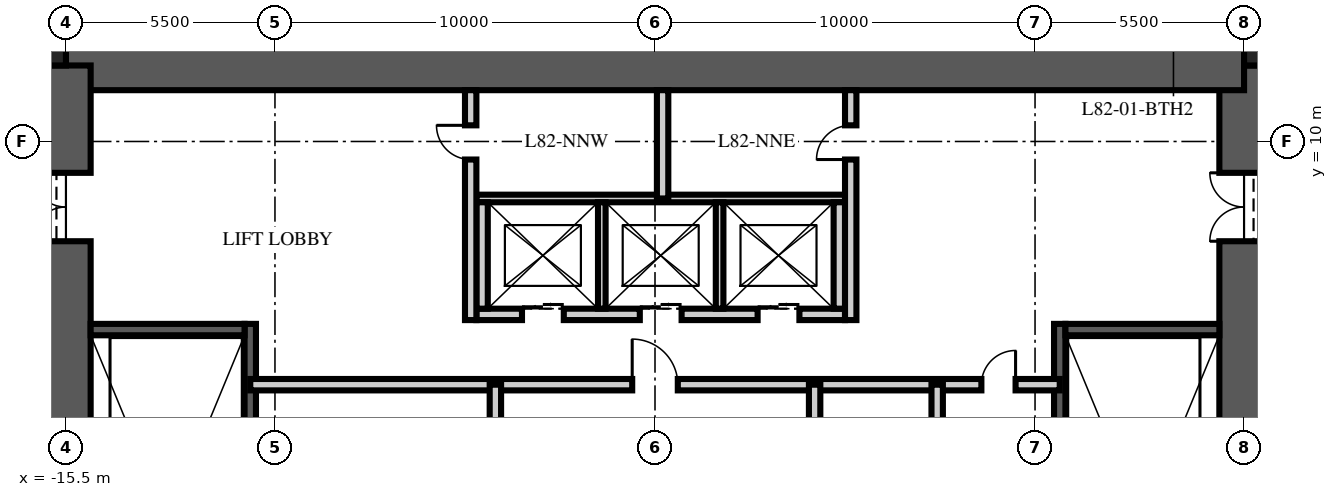
"""IFC4 building model, lengths in metres.
Left out: names, types, materials, properties, quantities, classifications, styles, units other than length and angle.
Written with IfcOpenShell. Run it as: python <this file> out.ifc"""

import sys

from ifc_helpers import new_model, si_unit, direction, frame, frame_2d, origin, origin_2d, place, context, subcontext, project, spatial, rectangle, extrude, element, fill, save


model = new_model("IFC4")
c1 = context("Model", 3, precision=1e-05, world=origin(), true_north=direction((0.0, 1.0)))
c2 = subcontext(c1, "Body", "Model", "MODEL_VIEW")
j1 = project(units=[si_unit("LENGTHUNIT", "METRE"), si_unit("PLANEANGLEUNIT", "RADIAN")], contexts=[c1])
p1 = place(None, origin())
s1 = spatial("IfcSite", under=j1, at=p1, CompositionType="ELEMENT")
p2 = place(p1, origin())
s2 = spatial("IfcBuilding", under=s1, at=p2, CompositionType="ELEMENT")
p3 = place(p2, frame((0.0, 0.0, 327.0)))
s3 = spatial("IfcBuildingStorey", under=s2, at=p3, CompositionType="ELEMENT", Elevation=327.0)
p4 = place(p3, frame((15.5, -12.0, -0.25), z_axis=(0.0, 0.0, 1.0), x_axis=(0.0, 1.0, 0.0)))
e1 = element("IfcWall", 1, at=p4, inside=s3, PredefinedType="SHEAR", context=c2, shape_type="SweptSolid", body=[
    extrude(rectangle(XDim=24.0, YDim=1.3, at=frame_2d((12.0, 0.0))), origin(), (0.0, 0.0, 1.0), 3.75),
])
p5 = place(p4, frame((3.125, 0.0, 0.25)))
e2 = element("IfcOpeningElement", 2, at=p5, cuts=e1, PredefinedType="OPENING", context=c2, shape_type="SweptSolid", body=[
    extrude(rectangle(XDim=1.2, YDim=2.1, at=frame_2d((0.6, 1.05))), frame((0.0, 0.66, 0.0), z_axis=(0.0, -1.0, 0.0), x_axis=(1.0, 0.0, 0.0)), (0.0, 0.0, 1.0), 1.32),
])
p6 = place(p4, frame((19.375, 0.0, 0.25)))
e3 = element("IfcOpeningElement", 3, at=p6, cuts=e1, PredefinedType="OPENING", context=c2, shape_type="SweptSolid", body=[
    extrude(rectangle(XDim=1.8, YDim=2.1, at=frame_2d((0.9, 1.05))), frame((0.0, 0.66, 0.0), z_axis=(0.0, -1.0, 0.0), x_axis=(1.0, 0.0, 0.0)), (0.0, 0.0, 1.0), 1.32),
])
p7 = place(p3, frame((-15.5, 12.0, -0.25), z_axis=(0.0, 0.0, 1.0), x_axis=(1.0, 0.0, 0.0)))
e4 = element("IfcWall", 4, at=p7, inside=s3, PredefinedType="SHEAR", context=c2, shape_type="SweptSolid", body=[
    extrude(rectangle(XDim=31.0, YDim=1.3, at=frame_2d((15.5, 0.0))), origin(), (0.0, 0.0, 1.0), 3.75),
])
p8 = place(p3, frame((-15.5, -12.0, -0.25), z_axis=(0.0, 0.0, 1.0), x_axis=(0.0, 1.0, 0.0)))
e5 = element("IfcWall", 5, at=p8, inside=s3, PredefinedType="SHEAR", context=c2, shape_type="SweptSolid", body=[
    extrude(rectangle(XDim=24.0, YDim=1.3, at=frame_2d((12.0, 0.0))), origin(), (0.0, 0.0, 1.0), 3.75),
])
p9 = place(p8, frame((3.125, 0.0, 0.25)))
e6 = element("IfcOpeningElement", 6, at=p9, cuts=e5, PredefinedType="OPENING", context=c2, shape_type="SweptSolid", body=[
    extrude(rectangle(XDim=1.2, YDim=2.1, at=frame_2d((0.6, 1.05))), frame((0.0, 0.66, 0.0), z_axis=(0.0, -1.0, 0.0), x_axis=(1.0, 0.0, 0.0)), (0.0, 0.0, 1.0), 1.32),
])
p10 = place(p8, frame((19.375, 0.0, 0.25)))
e7 = element("IfcOpeningElement", 7, at=p10, cuts=e5, PredefinedType="OPENING", context=c2, shape_type="SweptSolid", body=[
    extrude(rectangle(XDim=1.8, YDim=2.1, at=frame_2d((0.9, 1.05))), frame((0.0, 0.66, 0.0), z_axis=(0.0, -1.0, 0.0), x_axis=(1.0, 0.0, 0.0)), (0.0, 0.0, 1.0), 1.32),
])
for number, where, z_axis, x_axis in (
    (8, (15.825, 12.325, -0.25), (0.0, 0.0, 1.0), (1.0, 0.0, 0.0)),
    (9, (-15.825, 12.325, -0.25), (0.0, 0.0, 1.0), (1.0, 0.0, 0.0)),
):
    element("IfcColumn", number, at=place(p3, frame(where, z_axis=z_axis, x_axis=x_axis)), inside=s3, PredefinedType="COLUMN", context=c2, shape_type="SweptSolid", body=[
        extrude(rectangle(XDim=0.65, YDim=0.65, at=origin_2d()), origin(), (0.0, 0.0, 1.0), 3.75),
    ])
p11 = place(p3, frame((-10.65, -4.9, 0.0), z_axis=(0.0, 0.0, 1.0), x_axis=(0.0, 1.0, 0.0)))
e10 = element("IfcWall", 10, at=p11, inside=s3, PredefinedType="SOLIDWALL", context=c2, shape_type="SweptSolid", body=[
    extrude(rectangle(XDim=10.1, YDim=0.3, at=frame_2d((5.05, 0.0))), origin(), (0.0, 0.0, 1.0), 3.5),
])
p12 = place(p3, frame((-14.85, 5.05, 0.0), z_axis=(0.0, 0.0, 1.0), x_axis=(1.0, 0.0, 0.0)))
e11 = element("IfcWall", 11, at=p12, inside=s3, PredefinedType="SOLIDWALL", context=c2, shape_type="SweptSolid", body=[
    extrude(rectangle(XDim=4.05, YDim=0.3, at=frame_2d((2.025, 0.0))), origin(), (0.0, 0.0, 1.0), 3.5),
])
p13 = place(p3, frame((10.65, -4.9, 0.0), z_axis=(0.0, 0.0, 1.0), x_axis=(0.0, 1.0, 0.0)))
e12 = element("IfcWall", 12, at=p13, inside=s3, PredefinedType="SOLIDWALL", context=c2, shape_type="SweptSolid", body=[
    extrude(rectangle(XDim=10.1, YDim=0.3, at=frame_2d((5.05, 0.0))), origin(), (0.0, 0.0, 1.0), 3.5),
])
p14 = place(p3, frame((14.85, 5.05, 0.0), z_axis=(0.0, 0.0, 1.0), x_axis=(-1.0, 0.0, 0.0)))
e13 = element("IfcWall", 13, at=p14, inside=s3, PredefinedType="SOLIDWALL", context=c2, shape_type="SweptSolid", body=[
    extrude(rectangle(XDim=4.05, YDim=0.3, at=frame_2d((2.025, 0.0))), origin(), (0.0, 0.0, 1.0), 3.5),
])
p15 = place(p3, frame((-4.7, 5.45, 0.0), z_axis=(0.0, 0.0, 1.0), x_axis=(1.0, 0.0, 0.0)))
e14 = element("IfcWall", 14, at=p15, inside=s3, PredefinedType="PARTITIONING", context=c2, shape_type="SweptSolid", body=[
    extrude(rectangle(XDim=9.7, YDim=0.3, at=frame_2d((4.85, 0.0))), origin(), (0.0, 0.0, 1.0), 3.5),
])
p16 = place(p15, frame((1.2, 0.0, 0.0)))
e15 = element("IfcOpeningElement", 15, at=p16, cuts=e14, PredefinedType="OPENING", context=c2, shape_type="SweptSolid", body=[
    extrude(rectangle(XDim=1.1, YDim=2.1, at=frame_2d((0.55, 1.05))), frame((0.0, 0.16, 0.0), z_axis=(0.0, -1.0, 0.0), x_axis=(1.0, 0.0, 0.0)), (0.0, 0.0, 1.0), 0.32),
])
p17 = place(p15, frame((4.3, 0.0, 0.0)))
e16 = element("IfcOpeningElement", 16, at=p17, cuts=e14, PredefinedType="OPENING", context=c2, shape_type="SweptSolid", body=[
    extrude(rectangle(XDim=1.1, YDim=2.1, at=frame_2d((0.55, 1.05))), frame((0.0, 0.16, 0.0), z_axis=(0.0, -1.0, 0.0), x_axis=(1.0, 0.0, 0.0)), (0.0, 0.0, 1.0), 0.32),
])
p18 = place(p15, frame((7.4, 0.0, 0.0)))
e17 = element("IfcOpeningElement", 17, at=p18, cuts=e14, PredefinedType="OPENING", context=c2, shape_type="SweptSolid", body=[
    extrude(rectangle(XDim=1.1, YDim=2.1, at=frame_2d((0.55, 1.05))), frame((0.0, 0.16, 0.0), z_axis=(0.0, -1.0, 0.0), x_axis=(1.0, 0.0, 0.0)), (0.0, 0.0, 1.0), 0.32),
])
p19 = place(p3, frame((-4.7, 8.5, 0.0), z_axis=(0.0, 0.0, 1.0), x_axis=(1.0, 0.0, 0.0)))
e18 = element("IfcWall", 18, at=p19, inside=s3, PredefinedType="PARTITIONING", context=c2, shape_type="SweptSolid", body=[
    extrude(rectangle(XDim=9.7, YDim=0.2, at=frame_2d((4.85, 0.0))), origin(), (0.0, 0.0, 1.0), 3.5),
])
for number, where, z_axis, x_axis in (
    (19, (-4.55, 5.6, 0.0), (0.0, 0.0, 1.0), (0.0, 1.0, 0.0)),
    (20, (4.85, 5.6, 0.0), (0.0, 0.0, 1.0), (0.0, 1.0, 0.0)),
):
    element("IfcWall", number, at=place(p3, frame(where, z_axis=z_axis, x_axis=x_axis)), inside=s3, PredefinedType="PARTITIONING", context=c2, shape_type="SweptSolid", body=[
        extrude(rectangle(XDim=2.8, YDim=0.3, at=frame_2d((1.4, 0.0))), origin(), (0.0, 0.0, 1.0), 3.5),
    ])
for number, where, z_axis, x_axis in (
    (21, (-1.4, 5.6, 0.0), (0.0, 0.0, 1.0), (0.0, 1.0, 0.0)),
    (22, (1.7, 5.6, 0.0), (0.0, 0.0, 1.0), (0.0, 1.0, 0.0)),
):
    element("IfcWall", number, at=place(p3, frame(where, z_axis=z_axis, x_axis=x_axis)), inside=s3, PredefinedType="PARTITIONING", context=c2, shape_type="SweptSolid", body=[
        extrude(rectangle(XDim=2.8, YDim=0.2, at=frame_2d((1.4, 0.0))), origin(), (0.0, 0.0, 1.0), 3.5),
    ])
p20 = place(p3, frame((-10.65, 3.6, 0.0), z_axis=(0.0, 0.0, 1.0), x_axis=(1.0, 0.0, 0.0)))
e23 = element("IfcWall", 23, at=p20, inside=s3, PredefinedType="PARTITIONING", context=c2, shape_type="SweptSolid", body=[
    extrude(rectangle(XDim=21.3, YDim=0.3, at=frame_2d((10.65, 0.0))), origin(), (0.0, 0.0, 1.0), 3.5),
])
p21 = place(p20, frame((10.05, 0.0, 0.0)))
e24 = element("IfcOpeningElement", 24, at=p21, cuts=e23, PredefinedType="OPENING", context=c2, shape_type="SweptSolid", body=[
    extrude(rectangle(XDim=1.2, YDim=2.1, at=frame_2d((0.6, 1.05))), frame((0.0, 0.16, 0.0), z_axis=(0.0, -1.0, 0.0), x_axis=(1.0, 0.0, 0.0)), (0.0, 0.0, 1.0), 0.32),
])
p22 = place(p20, frame((19.238, 0.0, 0.0)))
e25 = element("IfcOpeningElement", 25, at=p22, cuts=e23, PredefinedType="OPENING", context=c2, shape_type="SweptSolid", body=[
    extrude(rectangle(XDim=0.9, YDim=2.1, at=frame_2d((0.45, 1.05))), frame((0.0, 0.16, 0.0), z_axis=(0.0, -1.0, 0.0), x_axis=(1.0, 0.0, 0.0)), (0.0, 0.0, 1.0), 0.32),
])
p23 = place(p3, frame((-4.2, -6.65, 0.0), z_axis=(0.0, 0.0, 1.0), x_axis=(0.0, 1.0, 0.0)))
e26 = element("IfcWall", 26, at=p23, inside=s3, PredefinedType="PARTITIONING", context=c2, shape_type="SweptSolid", body=[
    extrude(rectangle(XDim=10.25, YDim=0.3, at=frame_2d((5.125, 0.0))), origin(), (0.0, 0.0, 1.0), 3.5),
])
p24 = place(p23, frame((0.787, 0.0, 0.0)))
e27 = element("IfcOpeningElement", 27, at=p24, cuts=e26, PredefinedType="OPENING", context=c2, shape_type="SweptSolid", body=[
    extrude(rectangle(XDim=0.9, YDim=2.1, at=frame_2d((0.45, 1.05))), frame((0.0, 0.16, 0.0), z_axis=(0.0, -1.0, 0.0), x_axis=(1.0, 0.0, 0.0)), (0.0, 0.0, 1.0), 0.32),
])
p25 = place(p23, frame((5.912, 0.0, 0.0)))
e28 = element("IfcOpeningElement", 28, at=p25, cuts=e26, PredefinedType="OPENING", context=c2, shape_type="SweptSolid", body=[
    extrude(rectangle(XDim=0.9, YDim=2.1, at=frame_2d((0.45, 1.05))), frame((0.0, 0.16, 0.0), z_axis=(0.0, -1.0, 0.0), x_axis=(1.0, 0.0, 0.0)), (0.0, 0.0, 1.0), 0.32),
])
p26 = place(p3, frame((4.2, -6.65, 0.0), z_axis=(0.0, 0.0, 1.0), x_axis=(0.0, 1.0, 0.0)))
e29 = element("IfcWall", 29, at=p26, inside=s3, PredefinedType="PARTITIONING", context=c2, shape_type="SweptSolid", body=[
    extrude(rectangle(XDim=10.25, YDim=0.3, at=frame_2d((5.125, 0.0))), origin(), (0.0, 0.0, 1.0), 3.5),
])
p27 = place(p26, frame((2.15, 0.0, 0.0)))
e30 = element("IfcOpeningElement", 30, at=p27, cuts=e29, PredefinedType="OPENING", context=c2, shape_type="SweptSolid", body=[
    extrude(rectangle(XDim=0.9, YDim=2.1, at=frame_2d((0.45, 1.05))), frame((0.0, 0.16, 0.0), z_axis=(0.0, -1.0, 0.0), x_axis=(1.0, 0.0, 0.0)), (0.0, 0.0, 1.0), 0.32),
])
p28 = place(p26, frame((7.275, 0.0, 0.0)))
e31 = element("IfcOpeningElement", 31, at=p28, cuts=e29, PredefinedType="OPENING", context=c2, shape_type="SweptSolid", body=[
    extrude(rectangle(XDim=0.9, YDim=2.1, at=frame_2d((0.45, 1.05))), frame((0.0, 0.16, 0.0), z_axis=(0.0, -1.0, 0.0), x_axis=(1.0, 0.0, 0.0)), (0.0, 0.0, 1.0), 0.32),
])
p29 = place(p3, frame((7.425, -1.45, 0.0), z_axis=(0.0, 0.0, 1.0), x_axis=(0.0, 1.0, 0.0)))
e32 = element("IfcWall", 32, at=p29, inside=s3, PredefinedType="PARTITIONING", context=c2, shape_type="SweptSolid", body=[
    extrude(rectangle(XDim=5.05, YDim=0.3, at=frame_2d((2.525, 0.0))), origin(), (0.0, 0.0, 1.0), 3.5),
])
p30 = place(p3, frame((-4.85, 5.3, 0.0), z_axis=(0.0, 0.0, 1.0), x_axis=(0.0, 1.0, 0.0)))
e33 = element("IfcWall", 33, at=p30, inside=s3, PredefinedType="PARTITIONING", context=c2, shape_type="SweptSolid", body=[
    extrude(rectangle(XDim=6.05, YDim=0.3, at=frame_2d((3.025, 0.0))), origin(), (0.0, 0.0, 1.0), 3.5),
])
p31 = place(p30, frame((4.225, 0.0, 0.0)))
e34 = element("IfcOpeningElement", 34, at=p31, cuts=e33, PredefinedType="OPENING", context=c2, shape_type="SweptSolid", body=[
    extrude(rectangle(XDim=0.9, YDim=2.1, at=frame_2d((0.45, 1.05))), frame((0.0, 0.16, 0.0), z_axis=(0.0, -1.0, 0.0), x_axis=(1.0, 0.0, 0.0)), (0.0, 0.0, 1.0), 0.32),
])
p32 = place(p3, frame((5.15, 5.3, 0.0), z_axis=(0.0, 0.0, 1.0), x_axis=(0.0, 1.0, 0.0)))
e35 = element("IfcWall", 35, at=p32, inside=s3, PredefinedType="PARTITIONING", context=c2, shape_type="SweptSolid", body=[
    extrude(rectangle(XDim=6.05, YDim=0.3, at=frame_2d((3.025, 0.0))), origin(), (0.0, 0.0, 1.0), 3.5),
])
p33 = place(p32, frame((4.225, 0.0, 0.0)))
e36 = element("IfcOpeningElement", 36, at=p33, cuts=e35, PredefinedType="OPENING", context=c2, shape_type="SweptSolid", body=[
    extrude(rectangle(XDim=0.9, YDim=2.1, at=frame_2d((0.45, 1.05))), frame((0.0, 0.16, 0.0), z_axis=(0.0, -1.0, 0.0), x_axis=(1.0, 0.0, 0.0)), (0.0, 0.0, 1.0), 0.32),
])
p34 = place(p3, frame((0.2, 8.5, 0.0), z_axis=(0.0, 0.0, 1.0), x_axis=(0.0, 1.0, 0.0)))
e37 = element("IfcWall", 37, at=p34, inside=s3, PredefinedType="PARTITIONING", context=c2, shape_type="SweptSolid", body=[
    extrude(rectangle(XDim=2.85, YDim=0.3, at=frame_2d((1.425, 0.0))), origin(), (0.0, 0.0, 1.0), 3.5),
])
p35 = place(p10, origin())
e38 = element("IfcDoor", 38, at=p35, inside=s3, OperationType="DOUBLE_DOOR_SINGLE_SWING", PredefinedType="DOOR", context=c2, shape_type="SweptSolid", body=[
    extrude(rectangle(XDim=1.8, YDim=2.1, at=frame_2d((0.9, 1.05))), frame((0.0, 0.025, 0.0), z_axis=(0.0, -1.0, 0.0), x_axis=(1.0, 0.0, 0.0)), (0.0, 0.0, 1.0), 0.05),
])
fill(e7, e38)
p36 = place(p6, origin())
e39 = element("IfcDoor", 39, at=p36, inside=s3, OperationType="DOUBLE_DOOR_SINGLE_SWING", PredefinedType="DOOR", context=c2, shape_type="SweptSolid", body=[
    extrude(rectangle(XDim=1.8, YDim=2.1, at=frame_2d((0.9, 1.05))), frame((0.0, 0.025, 0.0), z_axis=(0.0, -1.0, 0.0), x_axis=(1.0, 0.0, 0.0)), (0.0, 0.0, 1.0), 0.05),
])
fill(e3, e39)
p37 = place(p16, origin())
e40 = element("IfcDoor", 40, at=p37, inside=s3, OperationType="DOUBLE_DOOR_SLIDING", PredefinedType="DOOR", context=c2, shape_type="SweptSolid", body=[
    extrude(rectangle(XDim=1.1, YDim=2.1, at=frame_2d((0.55, 1.05))), frame((0.0, 0.025, 0.0), z_axis=(0.0, -1.0, 0.0), x_axis=(1.0, 0.0, 0.0)), (0.0, 0.0, 1.0), 0.05),
])
fill(e15, e40)
p38 = place(p17, origin())
e41 = element("IfcDoor", 41, at=p38, inside=s3, OperationType="DOUBLE_DOOR_SLIDING", PredefinedType="DOOR", context=c2, shape_type="SweptSolid", body=[
    extrude(rectangle(XDim=1.1, YDim=2.1, at=frame_2d((0.55, 1.05))), frame((0.0, 0.025, 0.0), z_axis=(0.0, -1.0, 0.0), x_axis=(1.0, 0.0, 0.0)), (0.0, 0.0, 1.0), 0.05),
])
fill(e16, e41)
p39 = place(p18, origin())
e42 = element("IfcDoor", 42, at=p39, inside=s3, OperationType="DOUBLE_DOOR_SLIDING", PredefinedType="DOOR", context=c2, shape_type="SweptSolid", body=[
    extrude(rectangle(XDim=1.1, YDim=2.1, at=frame_2d((0.55, 1.05))), frame((0.0, 0.025, 0.0), z_axis=(0.0, -1.0, 0.0), x_axis=(1.0, 0.0, 0.0)), (0.0, 0.0, 1.0), 0.05),
])
fill(e17, e42)
p40 = place(p21, origin())
e43 = element("IfcDoor", 43, at=p40, inside=s3, OperationType="SINGLE_SWING_LEFT", PredefinedType="DOOR", context=c2, shape_type="SweptSolid", body=[
    extrude(rectangle(XDim=1.2, YDim=2.1, at=frame_2d((0.6, 1.05))), frame((0.0, 0.025, 0.0), z_axis=(0.0, -1.0, 0.0), x_axis=(1.0, 0.0, 0.0)), (0.0, 0.0, 1.0), 0.05),
])
fill(e24, e43)
p41 = place(p22, origin())
e44 = element("IfcDoor", 44, at=p41, inside=s3, OperationType="SINGLE_SWING_RIGHT", PredefinedType="DOOR", context=c2, shape_type="SweptSolid", body=[
    extrude(rectangle(XDim=0.9, YDim=2.1, at=frame_2d((0.45, 1.05))), frame((0.0, 0.025, 0.0), z_axis=(0.0, -1.0, 0.0), x_axis=(1.0, 0.0, 0.0)), (0.0, 0.0, 1.0), 0.05),
])
fill(e25, e44)
p42 = place(p31, origin())
e45 = element("IfcDoor", 45, at=p42, inside=s3, OperationType="SINGLE_SWING_RIGHT", PredefinedType="DOOR", context=c2, shape_type="SweptSolid", body=[
    extrude(rectangle(XDim=0.9, YDim=2.1, at=frame_2d((0.45, 1.05))), frame((0.0, 0.025, 0.0), z_axis=(0.0, -1.0, 0.0), x_axis=(1.0, 0.0, 0.0)), (0.0, 0.0, 1.0), 0.05),
])
fill(e34, e45)
p43 = place(p33, origin())
e46 = element("IfcDoor", 46, at=p43, inside=s3, OperationType="SINGLE_SWING_LEFT", PredefinedType="DOOR", context=c2, shape_type="SweptSolid", body=[
    extrude(rectangle(XDim=0.9, YDim=2.1, at=frame_2d((0.45, 1.05))), frame((0.0, 0.025, 0.0), z_axis=(0.0, -1.0, 0.0), x_axis=(1.0, 0.0, 0.0)), (0.0, 0.0, 1.0), 0.05),
])
fill(e36, e46)
save(model, sys.argv[1])
